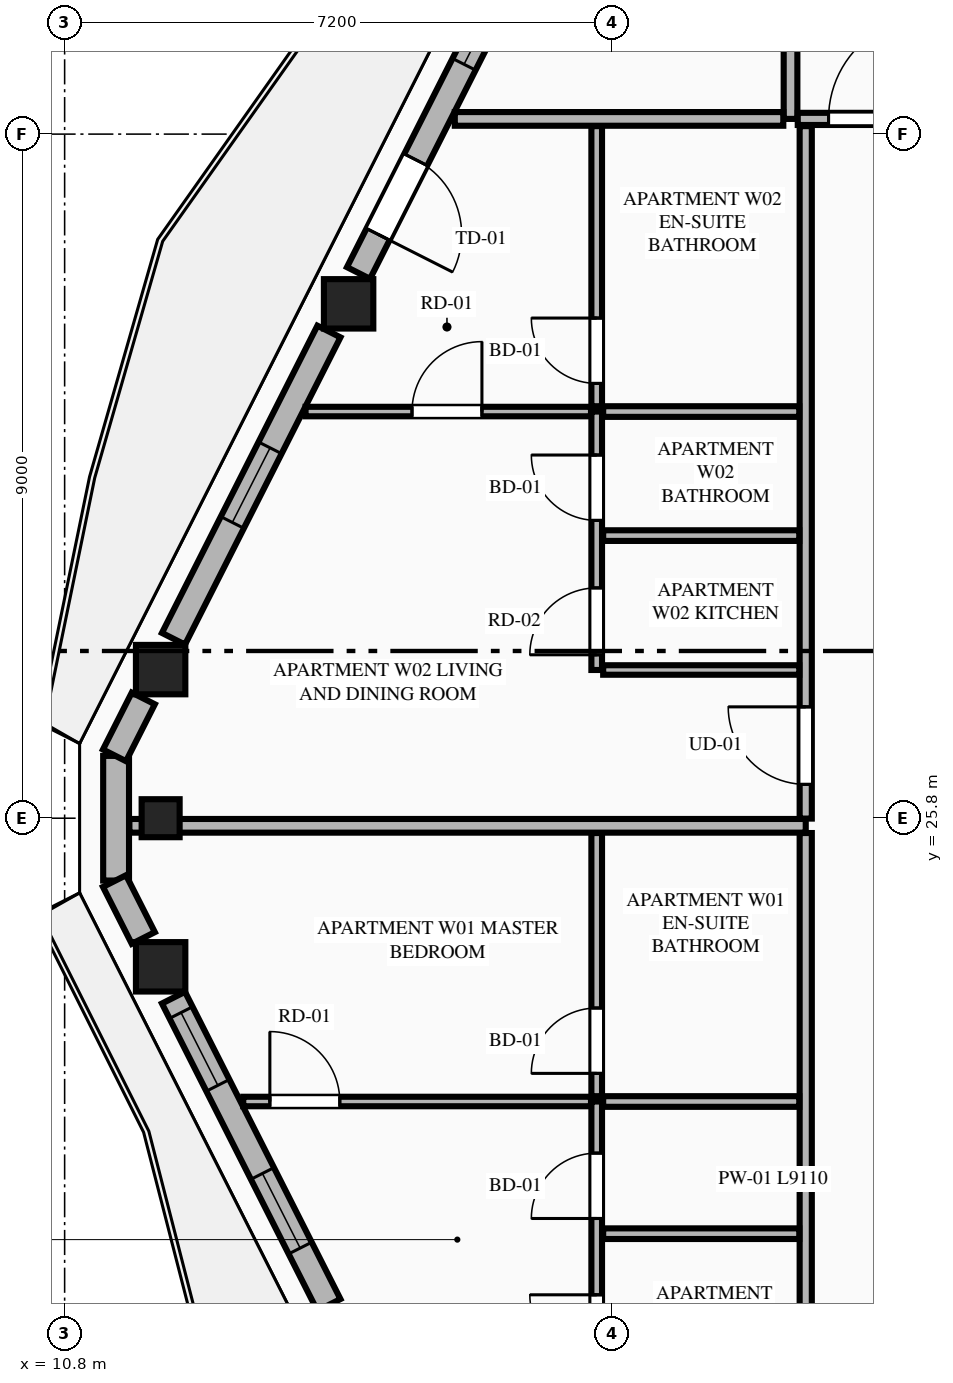
"""IFC4 building model, lengths in metres.
Left out: names, types, materials, properties, quantities, classifications, styles, units other than length and angle.
Written with IfcOpenShell. Run it as: python <this file> out.ifc"""

import sys

from ifc_helpers import new_model, si_unit, direction, frame, frame_2d, origin, origin_2d, place, context, subcontext, project, spatial, rectangle, extrude, element, fill, save


model = new_model("IFC4")
c1 = context("Model", 3, precision=1e-05, world=origin(), true_north=direction((0.0, 1.0)))
c2 = subcontext(c1, "Body", "Model", "MODEL_VIEW")
j1 = project(units=[si_unit("LENGTHUNIT", "METRE"), si_unit("PLANEANGLEUNIT", "RADIAN")], contexts=[c1])
p1 = place(None, origin())
s1 = spatial("IfcSite", under=j1, at=p1, CompositionType="ELEMENT")
p2 = place(p1, origin())
s2 = spatial("IfcBuilding", under=s1, at=p2, CompositionType="ELEMENT")
p3 = place(p2, frame((0.0, 0.0, 283.5)))
s3 = spatial("IfcBuildingStorey", under=s2, at=p3, CompositionType="ELEMENT", Elevation=283.5)
for number, where, z_axis, x_axis in (
    (1, (14.536, 32.567, 0.0), (0.0, 0.0, 1.0), (1.0, 0.0, 0.0)),
    (2, (12.063, 27.755, 0.0), (0.0, 0.0, 1.0), (1.0, 0.0, 0.0)),
    (3, (12.063, 23.845, 0.0), (0.0, 0.0, 1.0), (1.0, 0.0, 0.0)),
):
    element("IfcColumn", number, at=place(p3, frame(where, z_axis=z_axis, x_axis=x_axis)), inside=s3, PredefinedType="COLUMN", context=c2, shape_type="SweptSolid", body=[
        extrude(rectangle(XDim=0.65, YDim=0.65, at=origin_2d()), origin(), (0.0, 0.0, 1.0), 4.0),
    ])
p4 = place(p3, frame((12.063, 25.8, 0.0), z_axis=(0.0, 0.0, 1.0), x_axis=(0.0, -1.0, 0.0)))
e4 = element("IfcColumn", 4, at=p4, inside=s3, PredefinedType="PILASTER", context=c2, shape_type="SweptSolid", body=[
    extrude(rectangle(XDim=0.5, YDim=0.35, at=origin_2d()), origin(), (0.0, 0.0, 1.0), 4.0),
])
p5 = place(p3, frame((11.477, 26.62, 0.0), z_axis=(0.0, 0.0, 1.0), x_axis=(0.0, -1.0, 0.0)))
e5 = element("IfcWall", 5, at=p5, inside=s3, PredefinedType="STANDARD", context=c2, shape_type="SweptSolid", body=[
    extrude(rectangle(XDim=1.64, YDim=0.34, at=frame_2d((0.82, 0.0))), origin(), (0.0, 0.0, 1.0), 3.8),
])
p6 = place(p3, frame((16.798, 37.187, 0.0), z_axis=(0.0, 0.0, 1.0), x_axis=(-0.451447516904, -0.892297674255, 0.0)))
e6 = element("IfcWall", 6, at=p6, inside=s3, PredefinedType="STANDARD", context=c2, shape_type="SweptSolid", body=[
    extrude(rectangle(XDim=4.723, YDim=0.34, at=frame_2d((2.361, 0.0))), origin(), (0.0, 0.0, 1.0), 2.99),
])
p7 = place(p6, frame((3.053, 0.0, 0.0)))
e7 = element("IfcOpeningElement", 7, at=p7, cuts=e6, PredefinedType="OPENING", context=c2, shape_type="SweptSolid", body=[
    extrude(rectangle(XDim=1.1, YDim=2.25, at=frame_2d((0.55, 1.125))), frame((0.0, 0.18, 0.0), z_axis=(0.0, -1.0, 0.0), x_axis=(1.0, 0.0, 0.0)), (0.0, 0.0, 1.0), 0.36),
])
p8 = place(p6, frame((0.546, 0.0, 0.75)))
e8 = element("IfcOpeningElement", 8, at=p8, cuts=e6, PredefinedType="OPENING", context=c2, shape_type="SweptSolid", body=[
    extrude(rectangle(XDim=1.1, YDim=2.0, at=frame_2d((0.55, 1.0))), frame((0.0, 0.18, 0.0), z_axis=(0.0, -1.0, 0.0), x_axis=(1.0, 0.0, 0.0)), (0.0, 0.0, 1.0), 0.36),
])
p9 = place(p3, frame((14.277, 32.203, 0.0), z_axis=(0.0, 0.0, 1.0), x_axis=(-0.45147697324, -0.892282770558, 0.0)))
e9 = element("IfcWall", 9, at=p9, inside=s3, PredefinedType="STANDARD", context=c2, shape_type="SweptSolid", body=[
    extrude(rectangle(XDim=4.53, YDim=0.34, at=frame_2d((2.265, 0.0))), origin(), (0.0, 0.0, 1.0), 2.99),
])
p10 = place(p9, frame((1.715, 0.0, 0.75)))
e10 = element("IfcOpeningElement", 10, at=p10, cuts=e9, PredefinedType="OPENING", context=c2, shape_type="SweptSolid", body=[
    extrude(rectangle(XDim=1.1, YDim=2.0, at=frame_2d((0.55, 1.0))), frame((0.0, 0.18, 0.0), z_axis=(0.0, -1.0, 0.0), x_axis=(1.0, 0.0, 0.0)), (0.0, 0.0, 1.0), 0.36),
])
p11 = place(p3, frame((11.835, 27.376, 0.0), z_axis=(0.0, 0.0, 1.0), x_axis=(-0.45139691133, -0.892323275748, 0.0)))
e11 = element("IfcWall", 11, at=p11, inside=s3, PredefinedType="STANDARD", context=c2, shape_type="SweptSolid", body=[
    extrude(rectangle(XDim=0.839, YDim=0.34, at=frame_2d((0.42, 0.0))), origin(), (0.0, 0.0, 1.0), 3.8),
])
p12 = place(p3, frame((11.456, 24.973, 0.0), z_axis=(0.0, 0.0, 1.0), x_axis=(0.4515140893, -0.892263989615, 0.0)))
e12 = element("IfcWall", 12, at=p12, inside=s3, PredefinedType="STANDARD", context=c2, shape_type="SweptSolid", body=[
    extrude(rectangle(XDim=0.839, YDim=0.34, at=frame_2d((0.419, 0.0))), origin(), (0.0, 0.0, 1.0), 3.8),
])
p13 = place(p3, frame((12.232, 23.439, 0.0), z_axis=(0.0, 0.0, 1.0), x_axis=(0.45147697324, -0.892282770558, 0.0)))
e13 = element("IfcWall", 13, at=p13, inside=s3, PredefinedType="STANDARD", context=c2, shape_type="SweptSolid", body=[
    extrude(rectangle(XDim=4.53, YDim=0.34, at=frame_2d((2.265, 0.0))), origin(), (0.0, 0.0, 1.0), 2.99),
])
p14 = place(p13, frame((0.22, 0.0, 0.75)))
e14 = element("IfcOpeningElement", 14, at=p14, cuts=e13, PredefinedType="OPENING", context=c2, shape_type="SweptSolid", body=[
    extrude(rectangle(XDim=1.073, YDim=2.0, at=frame_2d((0.537, 1.0))), frame((0.0, 0.18, 0.0), z_axis=(0.0, -1.0, 0.0), x_axis=(1.0, 0.0, 0.0)), (0.0, 0.0, 1.0), 0.36),
])
p15 = place(p13, frame((2.592, 0.0, 0.75)))
e15 = element("IfcOpeningElement", 15, at=p15, cuts=e13, PredefinedType="OPENING", context=c2, shape_type="SweptSolid", body=[
    extrude(rectangle(XDim=1.1, YDim=2.0, at=frame_2d((0.55, 1.0))), frame((0.0, 0.18, 0.0), z_axis=(0.0, -1.0, 0.0), x_axis=(1.0, 0.0, 0.0)), (0.0, 0.0, 1.0), 0.36),
])
p16 = place(p3, frame((20.35, 35.0, 0.0), z_axis=(0.0, 0.0, 1.0), x_axis=(0.0, 1.0, 0.0)))
e16 = element("IfcWall", 16, at=p16, inside=s3, PredefinedType="PARTITIONING", context=c2, shape_type="SweptSolid", body=[
    extrude(rectangle(XDim=8.481, YDim=0.18, at=frame_2d((4.24, 0.0))), origin(), (0.0, 0.0, 1.0), 3.8),
])
p17 = place(p3, frame((20.445, 35.0, 0.0), z_axis=(0.0, 0.0, 1.0), x_axis=(1.0, 0.0, 0.0)))
e17 = element("IfcWall", 17, at=p17, inside=s3, PredefinedType="PARTITIONING", context=c2, shape_type="SweptSolid", body=[
    extrude(rectangle(XDim=23.91, YDim=0.16, at=frame_2d((11.955, 0.0))), origin(), (0.0, 0.0, 1.0), 3.8),
])
p18 = place(p17, frame((0.405, 0.0, 0.0)))
e18 = element("IfcOpeningElement", 18, at=p18, cuts=e17, PredefinedType="OPENING", context=c2, shape_type="SweptSolid", body=[
    extrude(rectangle(XDim=1.35, YDim=2.35, at=frame_2d((0.675, 1.175))), frame((0.0, 0.09, 0.0), z_axis=(0.0, -1.0, 0.0), x_axis=(1.0, 0.0, 0.0)), (0.0, 0.0, 1.0), 0.18),
])
p19 = place(p3, frame((15.933, 35.0, 0.0), z_axis=(0.0, 0.0, 1.0), x_axis=(1.0, 0.0, 0.0)))
e19 = element("IfcWall", 19, at=p19, inside=s3, PredefinedType="PARTITIONING", context=c2, shape_type="SweptSolid", body=[
    extrude(rectangle(XDim=4.322, YDim=0.18, at=frame_2d((2.161, 0.0))), origin(), (0.0, 0.0, 1.0), 3.8),
])
p20 = place(p3, frame((20.55, 16.495, 0.0), z_axis=(0.0, 0.0, 1.0), x_axis=(0.0, 1.0, 0.0)))
e20 = element("IfcWall", 20, at=p20, inside=s3, PredefinedType="PARTITIONING", context=c2, shape_type="SweptSolid", body=[
    extrude(rectangle(XDim=9.11, YDim=0.16, at=frame_2d((4.555, 0.0))), origin(), (0.0, 0.0, 1.0), 3.487),
])
p21 = place(p20, frame((0.45, 0.0, 0.0)))
e21 = element("IfcOpeningElement", 21, at=p21, cuts=e20, PredefinedType="OPENING", context=c2, shape_type="SweptSolid", body=[
    extrude(rectangle(XDim=1.02, YDim=2.25, at=frame_2d((0.51, 1.125))), frame((0.0, 0.09, 0.0), z_axis=(0.0, -1.0, 0.0), x_axis=(1.0, 0.0, 0.0)), (0.0, 0.0, 1.0), 0.18),
])
p22 = place(p3, frame((17.8, 18.45, 0.0), z_axis=(0.0, 0.0, 1.0), x_axis=(0.0, 1.0, 0.0)))
e22 = element("IfcWall", 22, at=p22, inside=s3, PredefinedType="PLUMBINGWALL", context=c2, shape_type="SweptSolid", body=[
    extrude(rectangle(XDim=3.623, YDim=0.14, at=frame_2d((1.812, 0.0))), origin(), (0.0, 0.0, 1.0), 3.8),
])
p23 = place(p22, frame((0.2, 0.0, 0.0)))
e23 = element("IfcOpeningElement", 23, at=p23, cuts=e22, PredefinedType="OPENING", context=c2, shape_type="SweptSolid", body=[
    extrude(rectangle(XDim=0.88, YDim=2.15, at=frame_2d((0.44, 1.075))), frame((0.0, 0.08, 0.0), z_axis=(0.0, -1.0, 0.0), x_axis=(1.0, 0.0, 0.0)), (0.0, 0.0, 1.0), 0.16),
])
p24 = place(p22, frame((2.084, 0.0, 0.0)))
e24 = element("IfcOpeningElement", 24, at=p24, cuts=e22, PredefinedType="OPENING", context=c2, shape_type="SweptSolid", body=[
    extrude(rectangle(XDim=0.86, YDim=2.1, at=frame_2d((0.43, 1.05))), frame((0.0, 0.08, 0.0), z_axis=(0.0, -1.0, 0.0), x_axis=(1.0, 0.0, 0.0)), (0.0, 0.0, 1.0), 0.16),
])
p25 = place(p3, frame((17.8, 22.143, 0.0), z_axis=(0.0, 0.0, 1.0), x_axis=(0.0, 1.0, 0.0)))
e25 = element("IfcWall", 25, at=p25, inside=s3, PredefinedType="PLUMBINGWALL", context=c2, shape_type="SweptSolid", body=[
    extrude(rectangle(XDim=3.462, YDim=0.14, at=frame_2d((1.731, 0.0))), origin(), (0.0, 0.0, 1.0), 3.8),
])
p26 = place(p25, frame((0.3, 0.0, 0.0)))
e26 = element("IfcOpeningElement", 26, at=p26, cuts=e25, PredefinedType="OPENING", context=c2, shape_type="SweptSolid", body=[
    extrude(rectangle(XDim=0.86, YDim=2.1, at=frame_2d((0.43, 1.05))), frame((0.0, 0.08, 0.0), z_axis=(0.0, -1.0, 0.0), x_axis=(1.0, 0.0, 0.0)), (0.0, 0.0, 1.0), 0.16),
])
p27 = place(p3, frame((17.885, 22.073, 0.0), z_axis=(0.0, 0.0, 1.0), x_axis=(1.0, 0.0, 0.0)))
e27 = element("IfcWall", 27, at=p27, inside=s3, PredefinedType="PLUMBINGWALL", context=c2, shape_type="SweptSolid", body=[
    extrude(rectangle(XDim=2.58, YDim=0.14, at=frame_2d((1.29, 0.0))), origin(), (0.0, 0.0, 1.0), 3.8),
])
p28 = place(p3, frame((13.15, 22.073, 0.0), z_axis=(0.0, 0.0, 1.0), x_axis=(1.0, 0.0, 0.0)))
e28 = element("IfcWall", 28, at=p28, inside=s3, PredefinedType="PARTITIONING", context=c2, shape_type="SweptSolid", body=[
    extrude(rectangle(XDim=4.575, YDim=0.125, at=frame_2d((2.288, 0.0))), origin(), (0.0, 0.0, 1.0), 3.8),
])
p29 = place(p28, frame((0.35, 0.0, 0.0)))
e29 = element("IfcOpeningElement", 29, at=p29, cuts=e28, PredefinedType="OPENING", context=c2, shape_type="SweptSolid", body=[
    extrude(rectangle(XDim=0.92, YDim=2.15, at=frame_2d((0.46, 1.075))), frame((0.0, 0.073, 0.0), z_axis=(0.0, -1.0, 0.0), x_axis=(1.0, 0.0, 0.0)), (0.0, 0.0, 1.0), 0.145),
])
p30 = place(p3, frame((17.885, 20.334, 0.0), z_axis=(0.0, 0.0, 1.0), x_axis=(1.0, 0.0, 0.0)))
e30 = element("IfcWall", 30, at=p30, inside=s3, PredefinedType="PLUMBINGWALL", context=c2, shape_type="SweptSolid", body=[
    extrude(rectangle(XDim=2.58, YDim=0.14, at=frame_2d((1.29, 0.0))), origin(), (0.0, 0.0, 1.0), 3.8),
])
p31 = place(p3, frame((11.652, 25.7, 0.0), z_axis=(0.0, 0.0, 1.0), x_axis=(1.0, 0.0, 0.0)))
e31 = element("IfcWall", 31, at=p31, inside=s3, PredefinedType="PARTITIONING", context=c2, shape_type="SweptSolid", body=[
    extrude(rectangle(XDim=8.898, YDim=0.18, at=frame_2d((4.449, 0.0))), origin(), (0.0, 0.0, 1.0), 3.8),
])
p32 = place(p3, frame((20.55, 25.795, 0.0), z_axis=(0.0, 0.0, 1.0), x_axis=(0.0, 1.0, 0.0)))
e32 = element("IfcWall", 32, at=p32, inside=s3, PredefinedType="PARTITIONING", context=c2, shape_type="SweptSolid", body=[
    extrude(rectangle(XDim=9.11, YDim=0.16, at=frame_2d((4.555, 0.0))), origin(), (0.0, 0.0, 1.0), 3.487),
])
p33 = place(p32, frame((0.45, 0.0, 0.0)))
e33 = element("IfcOpeningElement", 33, at=p33, cuts=e32, PredefinedType="OPENING", context=c2, shape_type="SweptSolid", body=[
    extrude(rectangle(XDim=1.02, YDim=2.25, at=frame_2d((0.51, 1.125))), frame((0.0, 0.09, 0.0), z_axis=(0.0, -1.0, 0.0), x_axis=(1.0, 0.0, 0.0)), (0.0, 0.0, 1.0), 0.18),
])
p34 = place(p3, frame((17.885, 27.75, 0.0), z_axis=(0.0, 0.0, 1.0), x_axis=(1.0, 0.0, 0.0)))
e34 = element("IfcWall", 34, at=p34, inside=s3, PredefinedType="PARTITIONING", context=c2, shape_type="SweptSolid", body=[
    extrude(rectangle(XDim=2.58, YDim=0.125, at=frame_2d((1.29, 0.0))), origin(), (0.0, 0.0, 1.0), 3.257),
])
p35 = place(p3, frame((17.8, 27.75, 0.0), z_axis=(0.0, 0.0, 1.0), x_axis=(0.0, 1.0, 0.0)))
e35 = element("IfcWall", 35, at=p35, inside=s3, PredefinedType="PLUMBINGWALL", context=c2, shape_type="SweptSolid", body=[
    extrude(rectangle(XDim=3.4, YDim=0.14, at=frame_2d((1.7, 0.0))), origin(), (0.0, 0.0, 1.0), 3.8),
])
p36 = place(p35, frame((0.2, 0.0, 0.0)))
e36 = element("IfcOpeningElement", 36, at=p36, cuts=e35, PredefinedType="OPENING", context=c2, shape_type="SweptSolid", body=[
    extrude(rectangle(XDim=0.88, YDim=2.15, at=frame_2d((0.44, 1.075))), frame((0.0, 0.08, 0.0), z_axis=(0.0, -1.0, 0.0), x_axis=(1.0, 0.0, 0.0)), (0.0, 0.0, 1.0), 0.16),
])
p37 = place(p35, frame((1.968, 0.0, 0.0)))
e37 = element("IfcOpeningElement", 37, at=p37, cuts=e35, PredefinedType="OPENING", context=c2, shape_type="SweptSolid", body=[
    extrude(rectangle(XDim=0.86, YDim=2.1, at=frame_2d((0.43, 1.05))), frame((0.0, 0.08, 0.0), z_axis=(0.0, -1.0, 0.0), x_axis=(1.0, 0.0, 0.0)), (0.0, 0.0, 1.0), 0.16),
])
p38 = place(p3, frame((17.8, 31.22, 0.0), z_axis=(0.0, 0.0, 1.0), x_axis=(0.0, 1.0, 0.0)))
e38 = element("IfcWall", 38, at=p38, inside=s3, PredefinedType="PLUMBINGWALL", context=c2, shape_type="SweptSolid", body=[
    extrude(rectangle(XDim=3.685, YDim=0.14, at=frame_2d((1.843, 0.0))), origin(), (0.0, 0.0, 1.0), 3.8),
])
p39 = place(p38, frame((0.3, 0.0, 0.0)))
e39 = element("IfcOpeningElement", 39, at=p39, cuts=e38, PredefinedType="OPENING", context=c2, shape_type="SweptSolid", body=[
    extrude(rectangle(XDim=0.86, YDim=2.1, at=frame_2d((0.43, 1.05))), frame((0.0, 0.08, 0.0), z_axis=(0.0, -1.0, 0.0), x_axis=(1.0, 0.0, 0.0)), (0.0, 0.0, 1.0), 0.16),
])
p40 = place(p3, frame((17.885, 31.15, 0.0), z_axis=(0.0, 0.0, 1.0), x_axis=(1.0, 0.0, 0.0)))
e40 = element("IfcWall", 40, at=p40, inside=s3, PredefinedType="PLUMBINGWALL", context=c2, shape_type="SweptSolid", body=[
    extrude(rectangle(XDim=2.58, YDim=0.14, at=frame_2d((1.29, 0.0))), origin(), (0.0, 0.0, 1.0), 3.8),
])
p41 = place(p3, frame((13.97, 31.15, 0.0), z_axis=(0.0, 0.0, 1.0), x_axis=(1.0, 0.0, 0.0)))
e41 = element("IfcWall", 41, at=p41, inside=s3, PredefinedType="PARTITIONING", context=c2, shape_type="SweptSolid", body=[
    extrude(rectangle(XDim=3.755, YDim=0.125, at=frame_2d((1.877, 0.0))), origin(), (0.0, 0.0, 1.0), 3.8),
])
p42 = place(p41, frame((1.4, 0.0, 0.0)))
e42 = element("IfcOpeningElement", 42, at=p42, cuts=e41, PredefinedType="OPENING", context=c2, shape_type="SweptSolid", body=[
    extrude(rectangle(XDim=0.92, YDim=2.15, at=frame_2d((0.46, 1.075))), frame((0.0, 0.073, 0.0), z_axis=(0.0, -1.0, 0.0), x_axis=(1.0, 0.0, 0.0)), (0.0, 0.0, 1.0), 0.145),
])
p43 = place(p3, frame((17.885, 29.518, 0.0), z_axis=(0.0, 0.0, 1.0), x_axis=(1.0, 0.0, 0.0)))
e43 = element("IfcWall", 43, at=p43, inside=s3, PredefinedType="PLUMBINGWALL", context=c2, shape_type="SweptSolid", body=[
    extrude(rectangle(XDim=2.58, YDim=0.14, at=frame_2d((1.29, 0.0))), origin(), (0.0, 0.0, 1.0), 3.8),
])
p44 = place(p7, origin())
e44 = element("IfcDoor", 44, at=p44, inside=s3, OperationType="SINGLE_SWING_RIGHT", PredefinedType="DOOR", context=c2, shape_type="SweptSolid", body=[
    extrude(rectangle(XDim=1.1, YDim=2.25, at=frame_2d((0.55, 1.125))), frame((0.0, 0.025, 0.0), z_axis=(0.0, -1.0, 0.0), x_axis=(1.0, 0.0, 0.0)), (0.0, 0.0, 1.0), 0.05),
])
fill(e7, e44)
p45 = place(p10, origin())
e45 = element("IfcWindow", 45, at=p45, inside=s3, PartitioningType="SINGLE_PANEL", PredefinedType="WINDOW", context=c2, shape_type="SweptSolid", body=[
    extrude(rectangle(XDim=1.1, YDim=2.0, at=frame_2d((0.55, 1.0))), frame((0.0, 0.03, 0.0), z_axis=(0.0, -1.0, 0.0), x_axis=(1.0, 0.0, 0.0)), (0.0, 0.0, 1.0), 0.06),
])
fill(e10, e45)
p46 = place(p14, origin())
e46 = element("IfcWindow", 46, at=p46, inside=s3, PartitioningType="SINGLE_PANEL", PredefinedType="WINDOW", context=c2, shape_type="SweptSolid", body=[
    extrude(rectangle(XDim=1.073, YDim=2.0, at=frame_2d((0.537, 1.0))), frame((0.0, 0.03, 0.0), z_axis=(0.0, -1.0, 0.0), x_axis=(1.0, 0.0, 0.0)), (0.0, 0.0, 1.0), 0.06),
])
fill(e14, e46)
p47 = place(p18, origin())
e47 = element("IfcDoor", 47, at=p47, inside=s3, OperationType="SINGLE_SWING_RIGHT", PredefinedType="DOOR", context=c2, shape_type="SweptSolid", body=[
    extrude(rectangle(XDim=1.35, YDim=2.35, at=frame_2d((0.675, 1.175))), frame((0.0, 0.025, 0.0), z_axis=(0.0, -1.0, 0.0), x_axis=(1.0, 0.0, 0.0)), (0.0, 0.0, 1.0), 0.05),
])
fill(e18, e47)
p48 = place(p23, origin())
e48 = element("IfcDoor", 48, at=p48, inside=s3, OperationType="SINGLE_SWING_RIGHT", PredefinedType="DOOR", context=c2, shape_type="SweptSolid", body=[
    extrude(rectangle(XDim=0.88, YDim=2.15, at=frame_2d((0.44, 1.075))), frame((0.0, 0.025, 0.0), z_axis=(0.0, -1.0, 0.0), x_axis=(1.0, 0.0, 0.0)), (0.0, 0.0, 1.0), 0.05),
])
fill(e23, e48)
p49 = place(p24, origin())
e49 = element("IfcDoor", 49, at=p49, inside=s3, OperationType="SINGLE_SWING_LEFT", PredefinedType="DOOR", context=c2, shape_type="SweptSolid", body=[
    extrude(rectangle(XDim=0.86, YDim=2.1, at=frame_2d((0.43, 1.05))), frame((0.0, 0.025, 0.0), z_axis=(0.0, -1.0, 0.0), x_axis=(1.0, 0.0, 0.0)), (0.0, 0.0, 1.0), 0.05),
])
fill(e24, e49)
p50 = place(p26, origin())
e50 = element("IfcDoor", 50, at=p50, inside=s3, OperationType="SINGLE_SWING_LEFT", PredefinedType="DOOR", context=c2, shape_type="SweptSolid", body=[
    extrude(rectangle(XDim=0.86, YDim=2.1, at=frame_2d((0.43, 1.05))), frame((0.0, 0.025, 0.0), z_axis=(0.0, -1.0, 0.0), x_axis=(1.0, 0.0, 0.0)), (0.0, 0.0, 1.0), 0.05),
])
fill(e26, e50)
p51 = place(p29, origin())
e51 = element("IfcDoor", 51, at=p51, inside=s3, OperationType="SINGLE_SWING_LEFT", PredefinedType="DOOR", context=c2, shape_type="SweptSolid", body=[
    extrude(rectangle(XDim=0.92, YDim=2.15, at=frame_2d((0.46, 1.075))), frame((0.0, 0.025, 0.0), z_axis=(0.0, -1.0, 0.0), x_axis=(1.0, 0.0, 0.0)), (0.0, 0.0, 1.0), 0.05),
])
fill(e29, e51)
p52 = place(p36, origin())
e52 = element("IfcDoor", 52, at=p52, inside=s3, OperationType="SINGLE_SWING_LEFT", PredefinedType="DOOR", context=c2, shape_type="SweptSolid", body=[
    extrude(rectangle(XDim=0.88, YDim=2.15, at=frame_2d((0.44, 1.075))), frame((0.0, 0.025, 0.0), z_axis=(0.0, -1.0, 0.0), x_axis=(1.0, 0.0, 0.0)), (0.0, 0.0, 1.0), 0.05),
])
fill(e36, e52)
p53 = place(p37, origin())
e53 = element("IfcDoor", 53, at=p53, inside=s3, OperationType="SINGLE_SWING_RIGHT", PredefinedType="DOOR", context=c2, shape_type="SweptSolid", body=[
    extrude(rectangle(XDim=0.86, YDim=2.1, at=frame_2d((0.43, 1.05))), frame((0.0, 0.025, 0.0), z_axis=(0.0, -1.0, 0.0), x_axis=(1.0, 0.0, 0.0)), (0.0, 0.0, 1.0), 0.05),
])
fill(e37, e53)
p54 = place(p39, origin())
e54 = element("IfcDoor", 54, at=p54, inside=s3, OperationType="SINGLE_SWING_RIGHT", PredefinedType="DOOR", context=c2, shape_type="SweptSolid", body=[
    extrude(rectangle(XDim=0.86, YDim=2.1, at=frame_2d((0.43, 1.05))), frame((0.0, 0.025, 0.0), z_axis=(0.0, -1.0, 0.0), x_axis=(1.0, 0.0, 0.0)), (0.0, 0.0, 1.0), 0.05),
])
fill(e39, e54)
p55 = place(p33, origin())
e55 = element("IfcDoor", 55, at=p55, inside=s3, OperationType="SINGLE_SWING_RIGHT", PredefinedType="DOOR", context=c2, shape_type="SweptSolid", body=[
    extrude(rectangle(XDim=1.02, YDim=2.25, at=frame_2d((0.51, 1.125))), frame((0.0, 0.025, 0.0), z_axis=(0.0, -1.0, 0.0), x_axis=(1.0, 0.0, 0.0)), (0.0, 0.0, 1.0), 0.05),
])
fill(e33, e55)
p56 = place(p42, origin())
e56 = element("IfcDoor", 56, at=p56, inside=s3, OperationType="SINGLE_SWING_RIGHT", PredefinedType="DOOR", context=c2, shape_type="SweptSolid", body=[
    extrude(rectangle(XDim=0.92, YDim=2.15, at=frame_2d((0.46, 1.075))), frame((0.0, 0.025, 0.0), z_axis=(0.0, -1.0, 0.0), x_axis=(1.0, 0.0, 0.0)), (0.0, 0.0, 1.0), 0.05),
])
fill(e42, e56)
p57 = place(p8, origin())
e57 = element("IfcWindow", 57, at=p57, inside=s3, PartitioningType="SINGLE_PANEL", PredefinedType="WINDOW", context=c2, shape_type="SweptSolid", body=[
    extrude(rectangle(XDim=1.1, YDim=2.0, at=frame_2d((0.55, 1.0))), frame((0.0, 0.03, 0.0), z_axis=(0.0, -1.0, 0.0), x_axis=(1.0, 0.0, 0.0)), (0.0, 0.0, 1.0), 0.06),
])
fill(e8, e57)
p58 = place(p15, origin())
e58 = element("IfcWindow", 58, at=p58, inside=s3, PartitioningType="SINGLE_PANEL", PredefinedType="WINDOW", context=c2, shape_type="SweptSolid", body=[
    extrude(rectangle(XDim=1.1, YDim=2.0, at=frame_2d((0.55, 1.0))), frame((0.0, 0.03, 0.0), z_axis=(0.0, -1.0, 0.0), x_axis=(1.0, 0.0, 0.0)), (0.0, 0.0, 1.0), 0.06),
])
fill(e15, e58)
save(model, sys.argv[1])
